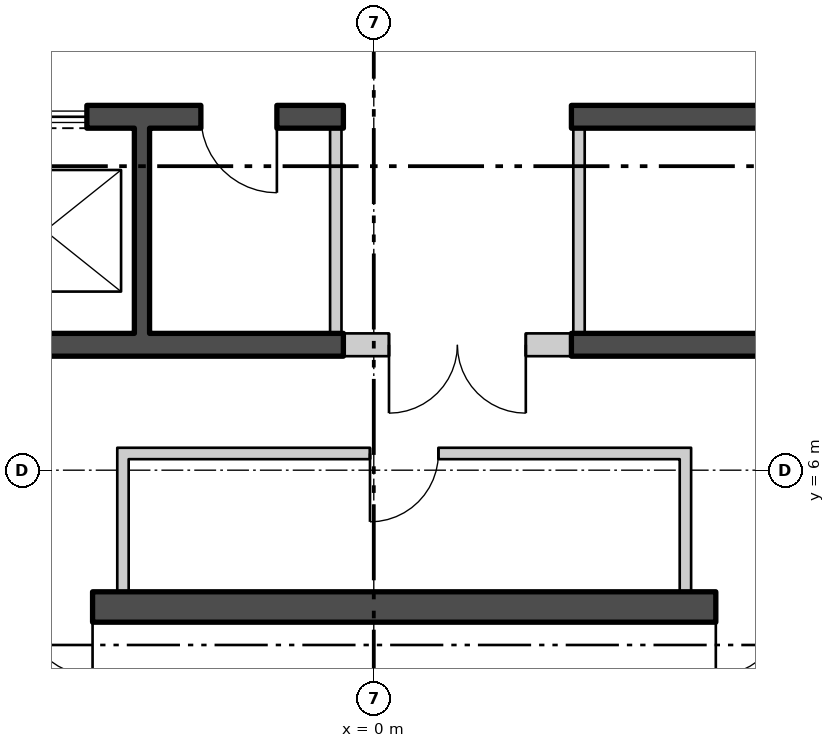
"""IFC4 building model, lengths in metres.
Left out: names, types, materials, properties, quantities, classifications, styles, units other than length and angle.
Written with IfcOpenShell. Run it as: python <this file> out.ifc"""

import sys

from ifc_helpers import new_model, si_unit, direction, frame, frame_2d, origin, place, context, subcontext, project, spatial, polyline, rectangle, outline, extrude, element, fill, save


model = new_model("IFC4")
c1 = context("Model", 3, precision=1e-05, world=origin(), true_north=direction((0.0, 1.0)))
c2 = subcontext(c1, "Body", "Model", "MODEL_VIEW")
j1 = project(units=[si_unit("LENGTHUNIT", "METRE"), si_unit("PLANEANGLEUNIT", "RADIAN")], contexts=[c1])
p1 = place(None, origin())
s1 = spatial("IfcSite", under=j1, at=p1, CompositionType="ELEMENT")
p2 = place(p1, origin())
s2 = spatial("IfcBuilding", under=s1, at=p2, CompositionType="ELEMENT")
p3 = place(p2, frame((0.0, 0.0, 245.4)))
s3 = spatial("IfcBuildingStorey", under=s2, at=p3, CompositionType="ELEMENT", Elevation=245.4)
p4 = place(p3, frame((-25.85, 14.822, -0.18), z_axis=(0.0, 0.0, 1.0), x_axis=(0.500000335318, -0.866025210188, 0.0)))
e1 = element("IfcWall", 1, at=p4, inside=s3, PredefinedType="SOLIDWALL", context=c2, shape_type="SweptSolid", body=[
    extrude(outline(polyline([(-0.13, -0.225), (45.88, -0.225), (45.62, 0.225), (0.13, 0.225), (-0.13, -0.225)])), origin(), (0.0, 0.0, 1.0), 3.68),
])
p5 = place(p4, frame((1.425, 0.0, 1.08)))
e2 = element("IfcOpeningElement", 2, at=p5, cuts=e1, PredefinedType="OPENING", context=c2, shape_type="SweptSolid", body=[
    extrude(rectangle(XDim=2.4, YDim=2.0, at=frame_2d((1.2, 1.0))), frame((0.0, 0.235, 0.0), z_axis=(0.0, -1.0, 0.0), x_axis=(1.0, 0.0, 0.0)), (0.0, 0.0, 1.0), 0.47),
])
p6 = place(p4, frame((10.403, 0.0, 1.08)))
e3 = element("IfcOpeningElement", 3, at=p6, cuts=e1, PredefinedType="OPENING", context=c2, shape_type="SweptSolid", body=[
    extrude(rectangle(XDim=2.4, YDim=2.0, at=frame_2d((1.2, 1.0))), frame((0.0, 0.235, 0.0), z_axis=(0.0, -1.0, 0.0), x_axis=(1.0, 0.0, 0.0)), (0.0, 0.0, 1.0), 0.47),
])
p7 = place(p4, frame((14.912, 0.0, 1.08)))
e4 = element("IfcOpeningElement", 4, at=p7, cuts=e1, PredefinedType="OPENING", context=c2, shape_type="SweptSolid", body=[
    extrude(rectangle(XDim=2.4, YDim=2.0, at=frame_2d((1.2, 1.0))), frame((0.0, 0.235, 0.0), z_axis=(0.0, -1.0, 0.0), x_axis=(1.0, 0.0, 0.0)), (0.0, 0.0, 1.0), 0.47),
])
p8 = place(p4, frame((19.421, 0.0, 1.08)))
e5 = element("IfcOpeningElement", 5, at=p8, cuts=e1, PredefinedType="OPENING", context=c2, shape_type="SweptSolid", body=[
    extrude(rectangle(XDim=2.4, YDim=2.0, at=frame_2d((1.2, 1.0))), frame((0.0, 0.235, 0.0), z_axis=(0.0, -1.0, 0.0), x_axis=(1.0, 0.0, 0.0)), (0.0, 0.0, 1.0), 0.47),
])
p9 = place(p4, frame((23.929, 0.0, 1.08)))
e6 = element("IfcOpeningElement", 6, at=p9, cuts=e1, PredefinedType="OPENING", context=c2, shape_type="SweptSolid", body=[
    extrude(rectangle(XDim=2.4, YDim=2.0, at=frame_2d((1.2, 1.0))), frame((0.0, 0.235, 0.0), z_axis=(0.0, -1.0, 0.0), x_axis=(1.0, 0.0, 0.0)), (0.0, 0.0, 1.0), 0.47),
])
p10 = place(p4, frame((28.438, 0.0, 1.08)))
e7 = element("IfcOpeningElement", 7, at=p10, cuts=e1, PredefinedType="OPENING", context=c2, shape_type="SweptSolid", body=[
    extrude(rectangle(XDim=2.4, YDim=2.0, at=frame_2d((1.2, 1.0))), frame((0.0, 0.235, 0.0), z_axis=(0.0, -1.0, 0.0), x_axis=(1.0, 0.0, 0.0)), (0.0, 0.0, 1.0), 0.47),
])
p11 = place(p4, frame((32.947, 0.0, 1.08)))
e8 = element("IfcOpeningElement", 8, at=p11, cuts=e1, PredefinedType="OPENING", context=c2, shape_type="SweptSolid", body=[
    extrude(rectangle(XDim=2.4, YDim=2.0, at=frame_2d((1.2, 1.0))), frame((0.0, 0.235, 0.0), z_axis=(0.0, -1.0, 0.0), x_axis=(1.0, 0.0, 0.0)), (0.0, 0.0, 1.0), 0.47),
])
p12 = place(p4, frame((37.455, 0.0, 1.08)))
e9 = element("IfcOpeningElement", 9, at=p12, cuts=e1, PredefinedType="OPENING", context=c2, shape_type="SweptSolid", body=[
    extrude(rectangle(XDim=2.4, YDim=2.0, at=frame_2d((1.2, 1.0))), frame((0.0, 0.235, 0.0), z_axis=(0.0, -1.0, 0.0), x_axis=(1.0, 0.0, 0.0)), (0.0, 0.0, 1.0), 0.47),
])
p13 = place(p4, frame((41.925, 0.0, 1.08)))
e10 = element("IfcOpeningElement", 10, at=p13, cuts=e1, PredefinedType="OPENING", context=c2, shape_type="SweptSolid", body=[
    extrude(rectangle(XDim=2.4, YDim=2.0, at=frame_2d((1.2, 1.0))), frame((0.0, 0.235, 0.0), z_axis=(0.0, -1.0, 0.0), x_axis=(1.0, 0.0, 0.0)), (0.0, 0.0, 1.0), 0.47),
])
p14 = place(p3, frame((2.975, -24.799, -0.18), z_axis=(0.0, 0.0, 1.0), x_axis=(0.500000335318, 0.866025210188, 0.0)))
e11 = element("IfcWall", 11, at=p14, inside=s3, PredefinedType="SOLIDWALL", context=c2, shape_type="SweptSolid", body=[
    extrude(outline(polyline([(-0.13, -0.225), (45.88, -0.225), (45.62, 0.225), (0.13, 0.225), (-0.13, -0.225)])), origin(), (0.0, 0.0, 1.0), 3.68),
])
p15 = place(p14, frame((1.425, 0.0, 1.08)))
e12 = element("IfcOpeningElement", 12, at=p15, cuts=e11, PredefinedType="OPENING", context=c2, shape_type="SweptSolid", body=[
    extrude(rectangle(XDim=2.4, YDim=2.0, at=frame_2d((1.2, 1.0))), frame((0.0, 0.235, 0.0), z_axis=(0.0, -1.0, 0.0), x_axis=(1.0, 0.0, 0.0)), (0.0, 0.0, 1.0), 0.47),
])
p16 = place(p14, frame((5.895, 0.0, 1.08)))
e13 = element("IfcOpeningElement", 13, at=p16, cuts=e11, PredefinedType="OPENING", context=c2, shape_type="SweptSolid", body=[
    extrude(rectangle(XDim=2.4, YDim=2.0, at=frame_2d((1.2, 1.0))), frame((0.0, 0.235, 0.0), z_axis=(0.0, -1.0, 0.0), x_axis=(1.0, 0.0, 0.0)), (0.0, 0.0, 1.0), 0.47),
])
p17 = place(p14, frame((10.403, 0.0, 1.08)))
e14 = element("IfcOpeningElement", 14, at=p17, cuts=e11, PredefinedType="OPENING", context=c2, shape_type="SweptSolid", body=[
    extrude(rectangle(XDim=2.4, YDim=2.0, at=frame_2d((1.2, 1.0))), frame((0.0, 0.235, 0.0), z_axis=(0.0, -1.0, 0.0), x_axis=(1.0, 0.0, 0.0)), (0.0, 0.0, 1.0), 0.47),
])
p18 = place(p14, frame((14.912, 0.0, 1.08)))
e15 = element("IfcOpeningElement", 15, at=p18, cuts=e11, PredefinedType="OPENING", context=c2, shape_type="SweptSolid", body=[
    extrude(rectangle(XDim=2.4, YDim=2.0, at=frame_2d((1.2, 1.0))), frame((0.0, 0.235, 0.0), z_axis=(0.0, -1.0, 0.0), x_axis=(1.0, 0.0, 0.0)), (0.0, 0.0, 1.0), 0.47),
])
p19 = place(p14, frame((19.421, 0.0, 1.08)))
e16 = element("IfcOpeningElement", 16, at=p19, cuts=e11, PredefinedType="OPENING", context=c2, shape_type="SweptSolid", body=[
    extrude(rectangle(XDim=2.4, YDim=2.0, at=frame_2d((1.2, 1.0))), frame((0.0, 0.235, 0.0), z_axis=(0.0, -1.0, 0.0), x_axis=(1.0, 0.0, 0.0)), (0.0, 0.0, 1.0), 0.47),
])
p20 = place(p14, frame((23.929, 0.0, 1.08)))
e17 = element("IfcOpeningElement", 17, at=p20, cuts=e11, PredefinedType="OPENING", context=c2, shape_type="SweptSolid", body=[
    extrude(rectangle(XDim=2.4, YDim=2.0, at=frame_2d((1.2, 1.0))), frame((0.0, 0.235, 0.0), z_axis=(0.0, -1.0, 0.0), x_axis=(1.0, 0.0, 0.0)), (0.0, 0.0, 1.0), 0.47),
])
p21 = place(p14, frame((28.438, 0.0, 1.08)))
e18 = element("IfcOpeningElement", 18, at=p21, cuts=e11, PredefinedType="OPENING", context=c2, shape_type="SweptSolid", body=[
    extrude(rectangle(XDim=2.4, YDim=2.0, at=frame_2d((1.2, 1.0))), frame((0.0, 0.235, 0.0), z_axis=(0.0, -1.0, 0.0), x_axis=(1.0, 0.0, 0.0)), (0.0, 0.0, 1.0), 0.47),
])
p22 = place(p14, frame((32.947, 0.0, 1.08)))
e19 = element("IfcOpeningElement", 19, at=p22, cuts=e11, PredefinedType="OPENING", context=c2, shape_type="SweptSolid", body=[
    extrude(rectangle(XDim=2.4, YDim=2.0, at=frame_2d((1.2, 1.0))), frame((0.0, 0.235, 0.0), z_axis=(0.0, -1.0, 0.0), x_axis=(1.0, 0.0, 0.0)), (0.0, 0.0, 1.0), 0.47),
])
p23 = place(p14, frame((37.455, 0.0, 1.08)))
e20 = element("IfcOpeningElement", 20, at=p23, cuts=e11, PredefinedType="OPENING", context=c2, shape_type="SweptSolid", body=[
    extrude(rectangle(XDim=2.4, YDim=2.0, at=frame_2d((1.2, 1.0))), frame((0.0, 0.235, 0.0), z_axis=(0.0, -1.0, 0.0), x_axis=(1.0, 0.0, 0.0)), (0.0, 0.0, 1.0), 0.47),
])
p24 = place(p14, frame((41.925, 0.0, 1.08)))
e21 = element("IfcOpeningElement", 21, at=p24, cuts=e11, PredefinedType="OPENING", context=c2, shape_type="SweptSolid", body=[
    extrude(rectangle(XDim=2.4, YDim=2.0, at=frame_2d((1.2, 1.0))), frame((0.0, 0.235, 0.0), z_axis=(0.0, -1.0, 0.0), x_axis=(1.0, 0.0, 0.0)), (0.0, 0.0, 1.0), 0.47),
])
p25 = place(p3, frame((-14.5, 4.2, 0.0), z_axis=(0.0, 0.0, 1.0), x_axis=(1.0, 0.0, 0.0)))
e22 = element("IfcWall", 22, at=p25, inside=s3, PredefinedType="SHEAR", context=c2, shape_type="SweptSolid", body=[
    extrude(rectangle(XDim=29.0, YDim=0.4, at=frame_2d((14.5, 0.0))), origin(), (0.0, 0.0, 1.0), 3.7),
])
p26 = place(p25, frame((9.0, 0.0, 0.0)))
e23 = element("IfcOpeningElement", 23, at=p26, cuts=e22, PredefinedType="OPENING", context=c2, shape_type="SweptSolid", body=[
    extrude(rectangle(XDim=1.8, YDim=2.4, at=frame_2d((0.9, 1.2))), frame((0.0, 0.21, 0.0), z_axis=(0.0, -1.0, 0.0), x_axis=(1.0, 0.0, 0.0)), (0.0, 0.0, 1.0), 0.42),
])
p27 = place(p25, frame((19.0, 0.0, 0.0)))
e24 = element("IfcOpeningElement", 24, at=p27, cuts=e22, PredefinedType="OPENING", context=c2, shape_type="SweptSolid", body=[
    extrude(rectangle(XDim=1.8, YDim=2.4, at=frame_2d((0.9, 1.2))), frame((0.0, 0.21, 0.0), z_axis=(0.0, -1.0, 0.0), x_axis=(1.0, 0.0, 0.0)), (0.0, 0.0, 1.0), 0.42),
])
p28 = place(p3, frame((-10.7, 10.65, 0.0), z_axis=(0.0, 0.0, 1.0), x_axis=(1.0, 0.0, 0.0)))
e25 = element("IfcWall", 25, at=p28, inside=s3, PredefinedType="SHEAR", context=c2, shape_type="SweptSolid", body=[
    extrude(rectangle(XDim=10.3, YDim=0.3, at=frame_2d((5.15, 0.0))), origin(), (0.0, 0.0, 1.0), 3.7),
])
p29 = place(p28, frame((0.675, 0.0, 0.0)))
e26 = element("IfcOpeningElement", 26, at=p29, cuts=e25, PredefinedType="OPENING", context=c2, shape_type="SweptSolid", body=[
    extrude(rectangle(XDim=1.1, YDim=2.1, at=frame_2d((0.55, 1.05))), frame((0.0, 0.16, 0.0), z_axis=(0.0, -1.0, 0.0), x_axis=(1.0, 0.0, 0.0)), (0.0, 0.0, 1.0), 0.32),
])
p30 = place(p28, frame((3.275, 0.0, 0.0)))
e27 = element("IfcOpeningElement", 27, at=p30, cuts=e25, PredefinedType="OPENING", context=c2, shape_type="SweptSolid", body=[
    extrude(rectangle(XDim=1.1, YDim=2.1, at=frame_2d((0.55, 1.05))), frame((0.0, 0.16, 0.0), z_axis=(0.0, -1.0, 0.0), x_axis=(1.0, 0.0, 0.0)), (0.0, 0.0, 1.0), 0.32),
])
p31 = place(p28, frame((5.825, 0.0, 0.0)))
e28 = element("IfcOpeningElement", 28, at=p31, cuts=e25, PredefinedType="OPENING", context=c2, shape_type="SweptSolid", body=[
    extrude(rectangle(XDim=1.1, YDim=2.1, at=frame_2d((0.55, 1.05))), frame((0.0, 0.16, 0.0), z_axis=(0.0, -1.0, 0.0), x_axis=(1.0, 0.0, 0.0)), (0.0, 0.0, 1.0), 0.32),
])
p32 = place(p28, frame((8.425, 0.0, 0.0)))
e29 = element("IfcOpeningElement", 29, at=p32, cuts=e25, PredefinedType="OPENING", context=c2, shape_type="SweptSolid", body=[
    extrude(rectangle(XDim=1.0, YDim=2.1, at=frame_2d((0.5, 1.05))), frame((0.0, 0.16, 0.0), z_axis=(0.0, -1.0, 0.0), x_axis=(1.0, 0.0, 0.0)), (0.0, 0.0, 1.0), 0.32),
])
p33 = place(p3, frame((-10.7, 7.65, 0.0), z_axis=(0.0, 0.0, 1.0), x_axis=(1.0, 0.0, 0.0)))
e30 = element("IfcWall", 30, at=p33, inside=s3, PredefinedType="SHEAR", context=c2, shape_type="SweptSolid", body=[
    extrude(rectangle(XDim=10.3, YDim=0.3, at=frame_2d((5.15, 0.0))), origin(), (0.0, 0.0, 1.0), 3.7),
])
p34 = place(p3, frame((2.6, 10.65, 0.0), z_axis=(0.0, 0.0, 1.0), x_axis=(1.0, 0.0, 0.0)))
e31 = element("IfcWall", 31, at=p34, inside=s3, PredefinedType="SHEAR", context=c2, shape_type="SweptSolid", body=[
    extrude(rectangle(XDim=8.1, YDim=0.3, at=frame_2d((4.05, 0.0))), origin(), (0.0, 0.0, 1.0), 3.7),
])
p35 = place(p34, frame((3.65, 0.0, 0.0)))
e32 = element("IfcOpeningElement", 32, at=p35, cuts=e31, PredefinedType="OPENING", context=c2, shape_type="SweptSolid", body=[
    extrude(rectangle(XDim=1.0, YDim=2.1, at=frame_2d((0.5, 1.05))), frame((0.0, 0.16, 0.0), z_axis=(0.0, -1.0, 0.0), x_axis=(1.0, 0.0, 0.0)), (0.0, 0.0, 1.0), 0.32),
])
p36 = place(p3, frame((2.6, 7.65, 0.0), z_axis=(0.0, 0.0, 1.0), x_axis=(1.0, 0.0, 0.0)))
e33 = element("IfcWall", 33, at=p36, inside=s3, PredefinedType="SHEAR", context=c2, shape_type="SweptSolid", body=[
    extrude(rectangle(XDim=8.1, YDim=0.3, at=frame_2d((4.05, 0.0))), origin(), (0.0, 0.0, 1.0), 3.7),
])
p37 = place(p3, frame((-3.05, 7.8, 0.0), z_axis=(0.0, 0.0, 1.0), x_axis=(0.0, 1.0, 0.0)))
e34 = element("IfcWall", 34, at=p37, inside=s3, PredefinedType="SHEAR", context=c2, shape_type="SweptSolid", body=[
    extrude(rectangle(XDim=2.7, YDim=0.2, at=frame_2d((1.35, 0.0))), origin(), (0.0, 0.0, 1.0), 3.7),
])
for number, where, z_axis, x_axis in (
    (35, (-0.5, 7.8, 0.0), (0.0, 0.0, 1.0), (0.0, 1.0, 0.0)),
    (36, (2.7, 7.8, 0.0), (0.0, 0.0, 1.0), (0.0, 1.0, 0.0)),
):
    element("IfcWall", number, at=place(p3, frame(where, z_axis=z_axis, x_axis=x_axis)), inside=s3, PredefinedType="PARTITIONING", context=c2, shape_type="SweptSolid", body=[
        extrude(rectangle(XDim=2.7, YDim=0.15, at=frame_2d((1.35, 0.0))), origin(), (0.0, 0.0, 1.0), 3.7),
    ])
for number, where, z_axis, x_axis in (
    (37, (-3.3, 4.4, 0.0), (0.0, 0.0, 1.0), (0.0, 1.0, 0.0)),
    (38, (4.1, 4.4, 0.0), (0.0, 0.0, 1.0), (0.0, 1.0, 0.0)),
):
    element("IfcWall", number, at=place(p3, frame(where, z_axis=z_axis, x_axis=x_axis)), inside=s3, PredefinedType="PARTITIONING", context=c2, shape_type="SweptSolid", body=[
        extrude(rectangle(XDim=1.895, YDim=0.15, at=frame_2d((0.948, 0.0))), origin(), (0.0, 0.0, 1.0), 3.7),
    ])
p38 = place(p3, frame((-3.225, 6.22, 0.0), z_axis=(0.0, 0.0, 1.0), x_axis=(1.0, 0.0, 0.0)))
e39 = element("IfcWall", 39, at=p38, inside=s3, PredefinedType="PARTITIONING", context=c2, shape_type="SweptSolid", body=[
    extrude(rectangle(XDim=7.25, YDim=0.15, at=frame_2d((3.625, 0.0))), origin(), (0.0, 0.0, 1.0), 3.7),
])
p39 = place(p38, frame((3.175, 0.0, 0.0)))
e40 = element("IfcOpeningElement", 40, at=p39, cuts=e39, PredefinedType="OPENING", context=c2, shape_type="SweptSolid", body=[
    extrude(rectangle(XDim=0.9, YDim=2.1, at=frame_2d((0.45, 1.05))), frame((0.0, 0.085, 0.0), z_axis=(0.0, -1.0, 0.0), x_axis=(1.0, 0.0, 0.0)), (0.0, 0.0, 1.0), 0.17),
])
p40 = place(p3, frame((-0.4, 7.65, 0.0), z_axis=(0.0, 0.0, 1.0), x_axis=(1.0, 0.0, 0.0)))
e41 = element("IfcWall", 41, at=p40, inside=s3, PredefinedType="PARTITIONING", context=c2, shape_type="SweptSolid", body=[
    extrude(rectangle(XDim=3.0, YDim=0.3, at=frame_2d((1.5, 0.0))), origin(), (0.0, 0.0, 1.0), 3.7),
])
p41 = place(p40, frame((0.6, 0.0, 0.0)))
e42 = element("IfcOpeningElement", 42, at=p41, cuts=e41, PredefinedType="OPENING", context=c2, shape_type="SweptSolid", body=[
    extrude(rectangle(XDim=1.8, YDim=2.4, at=frame_2d((0.9, 1.2))), frame((0.0, 0.16, 0.0), z_axis=(0.0, -1.0, 0.0), x_axis=(1.0, 0.0, 0.0)), (0.0, 0.0, 1.0), 0.32),
])
p42 = place(p31, origin())
e43 = element("IfcDoor", 43, at=p42, inside=s3, OperationType="SLIDING_TO_LEFT", PredefinedType="DOOR", context=c2, shape_type="SweptSolid", body=[
    extrude(rectangle(XDim=1.1, YDim=2.1, at=frame_2d((0.55, 1.05))), frame((0.0, 0.025, 0.0), z_axis=(0.0, -1.0, 0.0), x_axis=(1.0, 0.0, 0.0)), (0.0, 0.0, 1.0), 0.05),
])
fill(e28, e43)
p43 = place(p32, origin())
e44 = element("IfcDoor", 44, at=p43, inside=s3, OperationType="SINGLE_SWING_RIGHT", PredefinedType="DOOR", context=c2, shape_type="SweptSolid", body=[
    extrude(rectangle(XDim=1.0, YDim=2.1, at=frame_2d((0.5, 1.05))), frame((0.0, 0.025, 0.0), z_axis=(0.0, -1.0, 0.0), x_axis=(1.0, 0.0, 0.0)), (0.0, 0.0, 1.0), 0.05),
])
fill(e29, e44)
p44 = place(p39, origin())
e45 = element("IfcDoor", 45, at=p44, inside=s3, OperationType="SINGLE_SWING_LEFT", PredefinedType="DOOR", context=c2, shape_type="SweptSolid", body=[
    extrude(rectangle(XDim=0.9, YDim=2.1, at=frame_2d((0.45, 1.05))), frame((0.0, 0.025, 0.0), z_axis=(0.0, -1.0, 0.0), x_axis=(1.0, 0.0, 0.0)), (0.0, 0.0, 1.0), 0.05),
])
fill(e40, e45)
p45 = place(p41, origin())
e46 = element("IfcDoor", 46, at=p45, inside=s3, OperationType="DOUBLE_DOOR_SINGLE_SWING", PredefinedType="DOOR", context=c2, shape_type="SweptSolid", body=[
    extrude(rectangle(XDim=1.8, YDim=2.4, at=frame_2d((0.9, 1.2))), frame((0.0, 0.025, 0.0), z_axis=(0.0, -1.0, 0.0), x_axis=(1.0, 0.0, 0.0)), (0.0, 0.0, 1.0), 0.05),
])
fill(e42, e46)
p46 = place(p26, origin())
e47 = element("IfcDoor", 47, at=p46, inside=s3, OperationType="DOUBLE_DOOR_SINGLE_SWING", PredefinedType="DOOR", context=c2, shape_type="SweptSolid", body=[
    extrude(rectangle(XDim=1.8, YDim=2.4, at=frame_2d((0.9, 1.2))), frame((0.0, 0.025, 0.0), z_axis=(0.0, -1.0, 0.0), x_axis=(1.0, 0.0, 0.0)), (0.0, 0.0, 1.0), 0.05),
])
fill(e23, e47)
p47 = place(p27, origin())
e48 = element("IfcDoor", 48, at=p47, inside=s3, OperationType="DOUBLE_DOOR_SINGLE_SWING", PredefinedType="DOOR", context=c2, shape_type="SweptSolid", body=[
    extrude(rectangle(XDim=1.8, YDim=2.4, at=frame_2d((0.9, 1.2))), frame((0.0, 0.025, 0.0), z_axis=(0.0, -1.0, 0.0), x_axis=(1.0, 0.0, 0.0)), (0.0, 0.0, 1.0), 0.05),
])
fill(e24, e48)
save(model, sys.argv[1])
